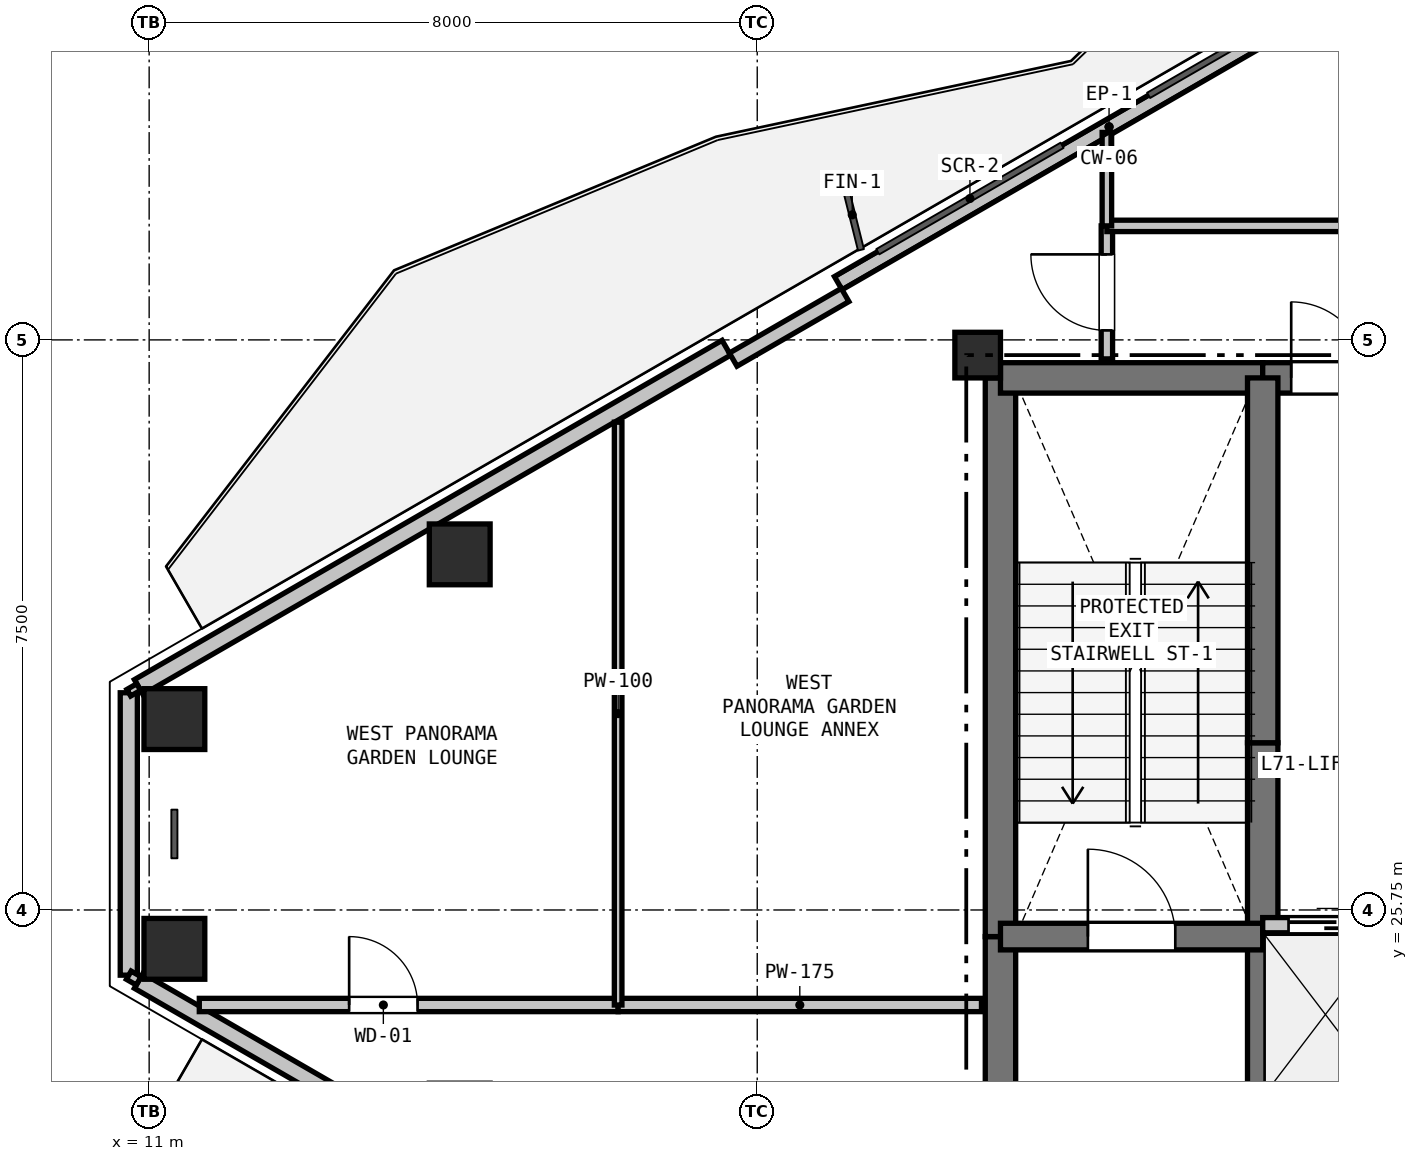
"""IFC4 building model, lengths in metres.
Left out: names, types, materials, properties, quantities, classifications, styles, units other than length and angle.
Written with IfcOpenShell. Run it as: python <this file> out.ifc"""

import sys

from ifc_helpers import new_model, si_unit, direction, frame, frame_2d, origin, origin_2d, place, context, subcontext, project, spatial, rectangle, hollow_rectangle, extrude, element, fill, save


model = new_model("IFC4")
c1 = context("Model", 3, precision=1e-05, world=origin(), true_north=direction((0.0, 1.0)))
c2 = subcontext(c1, "Body", "Model", "MODEL_VIEW")
j1 = project(units=[si_unit("LENGTHUNIT", "METRE"), si_unit("PLANEANGLEUNIT", "RADIAN")], contexts=[c1])
p1 = place(None, origin())
s1 = spatial("IfcSite", under=j1, at=p1, CompositionType="ELEMENT")
p2 = place(p1, origin())
s2 = spatial("IfcBuilding", under=s1, at=p2, CompositionType="ELEMENT")
p3 = place(p2, frame((0.0, 0.0, 254.1)))
s3 = spatial("IfcBuildingStorey", under=s2, at=p3, CompositionType="ELEMENT", Elevation=254.1)
p4 = place(p3, frame((21.9, 33.05, 0.0), z_axis=(0.0, 0.0, 1.0), x_axis=(1.0, 0.0, 0.0)))
e1 = element("IfcColumn", 1, at=p4, inside=s3, PredefinedType="COLUMN", context=c2, shape_type="SweptSolid", body=[
    extrude(rectangle(XDim=0.6, YDim=0.6, at=origin_2d()), origin(), (0.0, 0.0, 1.0), 4.5),
])
for number, where, z_axis, x_axis in (
    (2, (11.332, 28.261, 0.0), (0.0, 0.0, 1.0), (1.0, 0.0, 0.0)),
    (3, (15.086, 30.428, 0.0), (0.0, 0.0, 1.0), (1.0, 0.0, 0.0)),
    (4, (11.332, 25.239, 0.0), (0.0, 0.0, 1.0), (1.0, 0.0, 0.0)),
):
    element("IfcColumn", number, at=place(p3, frame(where, z_axis=z_axis, x_axis=x_axis)), inside=s3, PredefinedType="COLUMN", context=c2, shape_type="SweptSolid", body=[
        extrude(hollow_rectangle(XDim=0.8, YDim=0.8, WallThickness=0.025, at=origin_2d()), origin(), (0.0, 0.0, 1.0), 4.5),
    ])
p5 = place(p3, frame((10.732, 24.892, 0.0), z_axis=(0.0, 0.0, 1.0), x_axis=(0.0, 1.0, 0.0)))
e5 = element("IfcWall", 5, at=p5, inside=s3, PredefinedType="SOLIDWALL", context=c2, shape_type="SweptSolid", body=[
    extrude(rectangle(XDim=3.715, YDim=0.225, at=frame_2d((1.858, 0.0))), origin(), (0.0, 0.0, 1.0), 3.8),
])
p6 = place(p3, frame((10.862, 28.683, 0.0), z_axis=(0.0, 0.0, 1.0), x_axis=(0.866026655105, 0.499997832642, 0.0)))
e6 = element("IfcWall", 6, at=p6, inside=s3, PredefinedType="SOLIDWALL", context=c2, shape_type="SweptSolid", body=[
    extrude(rectangle(XDim=8.928, YDim=0.225, at=frame_2d((4.464, 0.0))), origin(), (0.0, 0.0, 1.0), 3.8),
])
p7 = place(p3, frame((20.066, 33.997, 0.0), z_axis=(0.0, 0.0, 1.0), x_axis=(0.866019557082, 0.500010126649, 0.0)))
e7 = element("IfcWall", 7, at=p7, inside=s3, PredefinedType="PARAPET", context=c2, shape_type="SweptSolid", body=[
    extrude(rectangle(XDim=8.228, YDim=0.2, at=frame_2d((4.114, 0.0))), origin(), (0.0, 0.0, 1.0), 0.2),
])
p8 = place(p3, frame((18.684, 32.991, 0.0), z_axis=(0.0, 0.0, 1.0), x_axis=(0.866025371046, 0.500000056704, 0.0)))
e8 = element("IfcWall", 8, at=p8, inside=s3, PredefinedType="PARAPET", context=c2, shape_type="SweptSolid", body=[
    extrude(rectangle(XDim=1.7, YDim=0.2, at=frame_2d((0.85, 0.0))), origin(), (0.0, 0.0, 1.0), 3.8),
])
p9 = place(p3, frame((18.594, 20.354, 0.0), z_axis=(0.0, 0.0, 1.0), x_axis=(-0.866026655105, 0.499997832642, 0.0)))
e9 = element("IfcWall", 9, at=p9, inside=s3, PredefinedType="SOLIDWALL", context=c2, shape_type="SweptSolid", body=[
    extrude(rectangle(XDim=8.928, YDim=0.225, at=frame_2d((4.464, 0.0))), origin(), (0.0, 0.0, 1.0), 3.8),
])
p10 = place(p3, frame((22.2, 20.75, 0.0), z_axis=(0.0, 0.0, 1.0), x_axis=(0.0, 1.0, 0.0)))
e10 = element("IfcWall", 10, at=p10, inside=s3, PredefinedType="SHEAR", context=c2, shape_type="SweptSolid", body=[
    extrude(rectangle(XDim=4.65, YDim=0.4, at=frame_2d((2.325, 0.0))), origin(), (0.0, 0.0, 1.0), 4.18),
])
p11 = place(p3, frame((22.2, 25.4, 0.0), z_axis=(0.0, 0.0, 1.0), x_axis=(0.0, 1.0, 0.0)))
e11 = element("IfcWall", 11, at=p11, inside=s3, PredefinedType="SHEAR", context=c2, shape_type="SweptSolid", body=[
    extrude(rectangle(XDim=7.35, YDim=0.4, at=frame_2d((3.675, 0.0))), origin(), (0.0, 0.0, 1.0), 4.18),
])
p12 = place(p3, frame((22.2, 32.75, 0.0), z_axis=(0.0, 0.0, 1.0), x_axis=(1.0, 0.0, 0.0)))
e12 = element("IfcWall", 12, at=p12, inside=s3, PredefinedType="SHEAR", context=c2, shape_type="SweptSolid", body=[
    extrude(rectangle(XDim=3.45, YDim=0.4, at=frame_2d((1.725, 0.0))), origin(), (0.0, 0.0, 1.0), 4.18),
])
p13 = place(p3, frame((25.65, 32.75, 0.0), z_axis=(0.0, 0.0, 1.0), x_axis=(1.0, 0.0, 0.0)))
e13 = element("IfcWall", 13, at=p13, inside=s3, PredefinedType="SHEAR", context=c2, shape_type="SweptSolid", body=[
    extrude(rectangle(XDim=1.75, YDim=0.4, at=frame_2d((0.875, 0.0))), origin(), (0.0, 0.0, 1.0), 4.18),
])
p14 = place(p13, frame((0.375, 0.0, 0.0)))
e14 = element("IfcOpeningElement", 14, at=p14, cuts=e13, PredefinedType="OPENING", context=c2, shape_type="SweptSolid", body=[
    extrude(rectangle(XDim=1.0, YDim=2.15, at=frame_2d((0.5, 1.075))), frame((0.0, 0.21, 0.0), z_axis=(0.0, -1.0, 0.0), x_axis=(1.0, 0.0, 0.0)), (0.0, 0.0, 1.0), 0.42),
])
p15 = place(p3, frame((25.65, 22.75, 0.0), z_axis=(0.0, 0.0, 1.0), x_axis=(0.0, 1.0, 0.0)))
e15 = element("IfcWall", 15, at=p15, inside=s3, PredefinedType="SHEAR", context=c2, shape_type="SweptSolid", body=[
    extrude(rectangle(XDim=2.8, YDim=0.4, at=frame_2d((1.4, 0.0))), origin(), (0.0, 0.0, 1.0), 4.18),
])
p16 = place(p3, frame((25.65, 25.55, 0.0), z_axis=(0.0, 0.0, 1.0), x_axis=(0.0, 1.0, 0.0)))
e16 = element("IfcWall", 16, at=p16, inside=s3, PredefinedType="SHEAR", context=c2, shape_type="SweptSolid", body=[
    extrude(rectangle(XDim=2.4, YDim=0.4, at=frame_2d((1.2, 0.0))), origin(), (0.0, 0.0, 1.0), 4.18),
])
p17 = place(p3, frame((25.65, 27.95, 0.0), z_axis=(0.0, 0.0, 1.0), x_axis=(0.0, 1.0, 0.0)))
e17 = element("IfcWall", 17, at=p17, inside=s3, PredefinedType="SHEAR", context=c2, shape_type="SweptSolid", body=[
    extrude(rectangle(XDim=4.8, YDim=0.4, at=frame_2d((2.4, 0.0))), origin(), (0.0, 0.0, 1.0), 4.18),
])
p18 = place(p3, frame((22.2, 25.4, 0.0), z_axis=(0.0, 0.0, 1.0), x_axis=(1.0, 0.0, 0.0)))
e18 = element("IfcWall", 18, at=p18, inside=s3, PredefinedType="SHEAR", context=c2, shape_type="SweptSolid", body=[
    extrude(rectangle(XDim=3.45, YDim=0.35, at=frame_2d((1.725, 0.0))), origin(), (0.0, 0.0, 1.0), 4.18),
])
p19 = place(p18, frame((1.15, 0.0, 0.0)))
e19 = element("IfcOpeningElement", 19, at=p19, cuts=e18, PredefinedType="OPENING", context=c2, shape_type="SweptSolid", body=[
    extrude(rectangle(XDim=1.15, YDim=2.15, at=frame_2d((0.575, 1.075))), frame((0.0, 0.185, 0.0), z_axis=(0.0, -1.0, 0.0), x_axis=(1.0, 0.0, 0.0)), (0.0, 0.0, 1.0), 0.37),
])
p20 = place(p3, frame((25.65, 25.55, 0.0), z_axis=(0.0, 0.0, 1.0), x_axis=(1.0, 0.0, 0.0)))
e20 = element("IfcWall", 20, at=p20, inside=s3, PredefinedType="PARTITIONING", context=c2, shape_type="SweptSolid", body=[
    extrude(rectangle(XDim=4.95, YDim=0.2, at=frame_2d((2.475, 0.0))), origin(), (0.0, 0.0, 1.0), 4.18),
])
p21 = place(p20, frame((0.34, 0.0, 0.0)))
e21 = element("IfcOpeningElement", 21, at=p21, cuts=e20, PredefinedType="OPENING", context=c2, shape_type="SweptSolid", body=[
    extrude(rectangle(XDim=1.1, YDim=2.15, at=frame_2d((0.55, 1.075))), frame((0.0, 0.11, 0.0), z_axis=(0.0, -1.0, 0.0), x_axis=(1.0, 0.0, 0.0)), (0.0, 0.0, 1.0), 0.22),
])
p22 = place(p20, frame((1.99, 0.0, 0.0)))
e22 = element("IfcOpeningElement", 22, at=p22, cuts=e20, PredefinedType="OPENING", context=c2, shape_type="SweptSolid", body=[
    extrude(rectangle(XDim=1.1, YDim=2.15, at=frame_2d((0.55, 1.075))), frame((0.0, 0.11, 0.0), z_axis=(0.0, -1.0, 0.0), x_axis=(1.0, 0.0, 0.0)), (0.0, 0.0, 1.0), 0.22),
])
p23 = place(p20, frame((3.64, 0.0, 0.0)))
e23 = element("IfcOpeningElement", 23, at=p23, cuts=e20, PredefinedType="OPENING", context=c2, shape_type="SweptSolid", body=[
    extrude(rectangle(XDim=1.1, YDim=2.15, at=frame_2d((0.55, 1.075))), frame((0.0, 0.11, 0.0), z_axis=(0.0, -1.0, 0.0), x_axis=(1.0, 0.0, 0.0)), (0.0, 0.0, 1.0), 0.22),
])
p24 = place(p3, frame((23.6, 33.0, 0.0), z_axis=(0.0, 0.0, 1.0), x_axis=(0.0, 1.0, 0.0)))
e24 = element("IfcWall", 24, at=p24, inside=s3, PredefinedType="PARTITIONING", context=c2, shape_type="SweptSolid", body=[
    extrude(rectangle(XDim=1.75, YDim=0.15, at=frame_2d((0.875, 0.0))), origin(), (0.0, 0.0, 1.0), 3.705),
])
p25 = place(p24, frame((0.375, 0.0, 0.0)))
e25 = element("IfcOpeningElement", 25, at=p25, cuts=e24, PredefinedType="OPENING", context=c2, shape_type="SweptSolid", body=[
    extrude(rectangle(XDim=1.0, YDim=2.15, at=frame_2d((0.5, 1.075))), frame((0.0, 0.085, 0.0), z_axis=(0.0, -1.0, 0.0), x_axis=(1.0, 0.0, 0.0)), (0.0, 0.0, 1.0), 0.17),
])
p26 = place(p3, frame((23.6, 34.75, 0.0), z_axis=(0.0, 0.0, 1.0), x_axis=(1.0, 0.0, 0.0)))
e26 = element("IfcWall", 26, at=p26, inside=s3, PredefinedType="PARTITIONING", context=c2, shape_type="SweptSolid", body=[
    extrude(rectangle(XDim=9.4, YDim=0.15, at=frame_2d((4.7, 0.0))), origin(), (0.0, 0.0, 1.0), 4.18),
])
p27 = place(p26, frame((4.2, 0.0, 0.0)))
e27 = element("IfcOpeningElement", 27, at=p27, cuts=e26, PredefinedType="OPENING", context=c2, shape_type="SweptSolid", body=[
    extrude(rectangle(XDim=1.0, YDim=2.15, at=frame_2d((0.5, 1.075))), frame((0.0, 0.085, 0.0), z_axis=(0.0, -1.0, 0.0), x_axis=(1.0, 0.0, 0.0)), (0.0, 0.0, 1.0), 0.17),
])
p28 = place(p3, frame((11.66, 24.5, 0.0), z_axis=(0.0, 0.0, 1.0), x_axis=(1.0, 0.0, 0.0)))
e28 = element("IfcWall", 28, at=p28, inside=s3, PredefinedType="PLUMBINGWALL", context=c2, shape_type="SweptSolid", body=[
    extrude(rectangle(XDim=5.51, YDim=0.175, at=frame_2d((2.755, 0.0))), origin(), (0.0, 0.0, 1.0), 3.628),
])
p29 = place(p28, frame((1.971, 0.0, 0.0)))
e29 = element("IfcOpeningElement", 29, at=p29, cuts=e28, PredefinedType="OPENING", context=c2, shape_type="SweptSolid", body=[
    extrude(rectangle(XDim=0.9, YDim=2.1, at=frame_2d((0.45, 1.05))), frame((0.0, 0.097, 0.0), z_axis=(0.0, -1.0, 0.0), x_axis=(1.0, 0.0, 0.0)), (0.0, 0.0, 1.0), 0.195),
])
p30 = place(p3, frame((17.17, 24.5, 0.0), z_axis=(0.0, 0.0, 1.0), x_axis=(1.0, 0.0, 0.0)))
e30 = element("IfcWall", 30, at=p30, inside=s3, PredefinedType="PLUMBINGWALL", context=c2, shape_type="SweptSolid", body=[
    extrude(rectangle(XDim=4.78, YDim=0.175, at=frame_2d((2.39, 0.0))), origin(), (0.0, 0.0, 1.0), 3.705),
])
p31 = place(p3, frame((23.6, 34.75, 0.0), z_axis=(0.0, 0.0, 1.0), x_axis=(0.0, 1.0, 0.0)))
e31 = element("IfcWall", 31, at=p31, inside=s3, PredefinedType="PARTITIONING", context=c2, shape_type="SweptSolid", body=[
    extrude(rectangle(XDim=1.229, YDim=0.125, at=frame_2d((0.615, 0.0))), origin(), (0.0, 0.0, 1.0), 2.365),
])
p32 = place(p3, frame((17.17, 32.167, 0.0), z_axis=(0.0, 0.0, 1.0), x_axis=(0.0, -1.0, 0.0)))
e32 = element("IfcWall", 32, at=p32, inside=s3, PredefinedType="PARTITIONING", context=c2, shape_type="SweptSolid", body=[
    extrude(rectangle(XDim=7.667, YDim=0.1, at=frame_2d((3.833, 0.0))), origin(), (0.0, 0.0, 1.0), 2.365),
])
p33 = place(p3, frame((10.862, 24.817, 0.0), z_axis=(0.0, 0.0, 1.0), x_axis=(-0.866131372301, 0.499816412211, 0.0)))
e33 = element("IfcWall", 33, at=p33, inside=s3, PredefinedType="PARTITIONING", context=c2, shape_type="SweptSolid", body=[
    extrude(rectangle(XDim=0.15, YDim=0.125, at=frame_2d((0.075, 0.0))), origin(), (0.0, 0.0, 1.0), 4.18),
])
p34 = place(p3, frame((10.732, 28.608, 0.0), z_axis=(0.0, 0.0, 1.0), x_axis=(0.866131372301, 0.499816412211, 0.0)))
e34 = element("IfcWall", 34, at=p34, inside=s3, PredefinedType="PARTITIONING", context=c2, shape_type="SweptSolid", body=[
    extrude(rectangle(XDim=0.15, YDim=0.1, at=frame_2d((0.075, 0.0))), origin(), (0.0, 0.0, 1.0), 4.18),
])
p35 = place(p21, origin())
e35 = element("IfcDoor", 35, at=p35, inside=s3, OperationType="SLIDING_TO_LEFT", PredefinedType="DOOR", context=c2, shape_type="SweptSolid", body=[
    extrude(rectangle(XDim=1.1, YDim=2.15, at=frame_2d((0.55, 1.075))), frame((0.0, 0.025, 0.0), z_axis=(0.0, -1.0, 0.0), x_axis=(1.0, 0.0, 0.0)), (0.0, 0.0, 1.0), 0.05),
])
fill(e21, e35)
p36 = place(p14, origin())
e36 = element("IfcDoor", 36, at=p36, inside=s3, OperationType="SINGLE_SWING_LEFT", PredefinedType="DOOR", context=c2, shape_type="SweptSolid", body=[
    extrude(rectangle(XDim=1.0, YDim=2.15, at=frame_2d((0.5, 1.075))), frame((0.0, 0.025, 0.0), z_axis=(0.0, -1.0, 0.0), x_axis=(1.0, 0.0, 0.0)), (0.0, 0.0, 1.0), 0.05),
])
fill(e14, e36)
p37 = place(p19, origin())
e37 = element("IfcDoor", 37, at=p37, inside=s3, OperationType="SINGLE_SWING_LEFT", PredefinedType="DOOR", context=c2, shape_type="SweptSolid", body=[
    extrude(rectangle(XDim=1.15, YDim=2.15, at=frame_2d((0.575, 1.075))), frame((0.0, 0.025, 0.0), z_axis=(0.0, -1.0, 0.0), x_axis=(1.0, 0.0, 0.0)), (0.0, 0.0, 1.0), 0.05),
])
fill(e19, e37)
p38 = place(p25, origin())
e38 = element("IfcDoor", 38, at=p38, inside=s3, OperationType="SINGLE_SWING_RIGHT", PredefinedType="DOOR", context=c2, shape_type="SweptSolid", body=[
    extrude(rectangle(XDim=1.0, YDim=2.15, at=frame_2d((0.5, 1.075))), frame((0.0, 0.025, 0.0), z_axis=(0.0, -1.0, 0.0), x_axis=(1.0, 0.0, 0.0)), (0.0, 0.0, 1.0), 0.05),
])
fill(e25, e38)
p39 = place(p29, origin())
e39 = element("IfcDoor", 39, at=p39, inside=s3, OperationType="SINGLE_SWING_LEFT", PredefinedType="DOOR", context=c2, shape_type="SweptSolid", body=[
    extrude(rectangle(XDim=0.9, YDim=2.1, at=frame_2d((0.45, 1.05))), frame((0.0, 0.025, 0.0), z_axis=(0.0, -1.0, 0.0), x_axis=(1.0, 0.0, 0.0)), (0.0, 0.0, 1.0), 0.05),
])
fill(e29, e39)
save(model, sys.argv[1])
